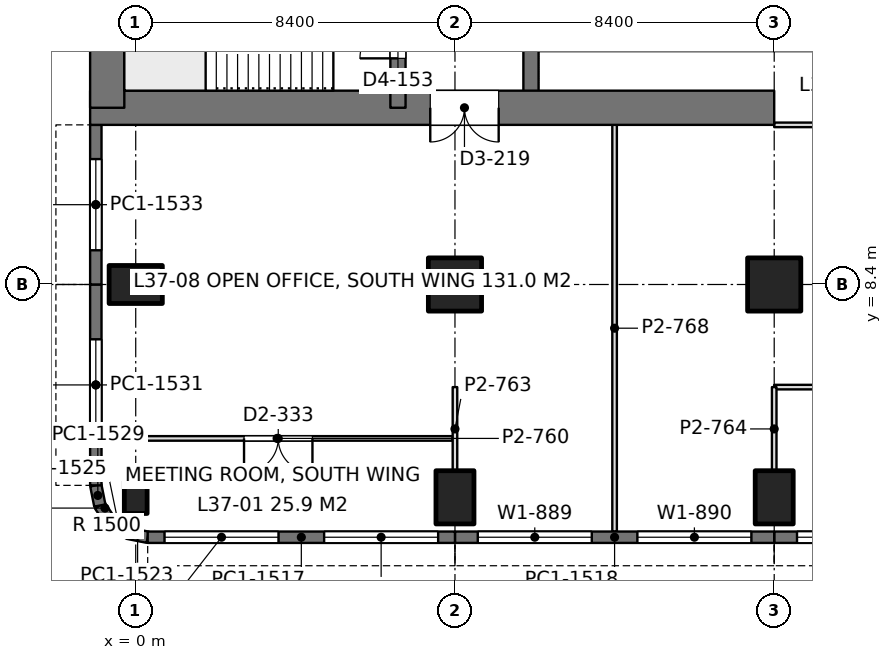
"""IFC4 building model, lengths in metres.
Left out: names, types, materials, properties, quantities, classifications, styles, units other than length and angle.
Written with IfcOpenShell. Run it as: python <this file> out.ifc"""

import sys

from ifc_helpers import new_model, si_unit, direction, frame, frame_2d, origin, origin_2d, place, context, subcontext, project, spatial, rectangle, extrude, element, fill, save


model = new_model("IFC4")
c1 = context("Model", 3, precision=1e-05, world=origin(), true_north=direction((0.0, 1.0)))
c2 = subcontext(c1, "Body", "Model", "MODEL_VIEW")
j1 = project(units=[si_unit("LENGTHUNIT", "METRE"), si_unit("PLANEANGLEUNIT", "RADIAN")], contexts=[c1])
p1 = place(None, origin())
s1 = spatial("IfcSite", under=j1, at=p1, CompositionType="ELEMENT")
p2 = place(p1, origin())
s2 = spatial("IfcBuilding", under=s1, at=p2, CompositionType="ELEMENT")
p3 = place(p2, frame((0.0, 0.0, 163.8)))
s3 = spatial("IfcBuildingStorey", under=s2, at=p3, CompositionType="ELEMENT", Elevation=163.8)
p4 = place(p3, frame((0.0, 2.8, 0.0), z_axis=(0.0, 0.0, 1.0), x_axis=(1.0, 0.0, 0.0)))
e1 = element("IfcColumn", 1, at=p4, inside=s3, PredefinedType="COLUMN", context=c2, shape_type="SweptSolid", body=[
    extrude(rectangle(XDim=0.6, YDim=0.85, at=origin_2d()), origin(), (0.0, 0.0, 1.0), 4.2),
])
for number, where, z_axis, x_axis in (
    (2, (0.0, 8.4, 0.0), (0.0, 0.0, 1.0), (0.0, 1.0, 0.0)),
    (3, (8.4, 2.8, 0.0), (0.0, 0.0, 1.0), (1.0, 0.0, 0.0)),
):
    element("IfcColumn", number, at=place(p3, frame(where, z_axis=z_axis, x_axis=x_axis)), inside=s3, PredefinedType="COLUMN", context=c2, shape_type="SweptSolid", body=[
        extrude(rectangle(XDim=1.0, YDim=1.4, at=origin_2d()), origin(), (0.0, 0.0, 1.0), 4.2),
    ])
p5 = place(p3, frame((8.4, 8.4, 0.0), z_axis=(0.0, 0.0, 1.0), x_axis=(1.0, 0.0, 0.0)))
e4 = element("IfcColumn", 4, at=p5, inside=s3, PredefinedType="COLUMN", context=c2, shape_type="SweptSolid", body=[
    extrude(rectangle(XDim=1.4, YDim=1.4, at=origin_2d()), origin(), (0.0, 0.0, 1.0), 4.2),
])
p6 = place(p3, frame((16.8, 2.8, 0.0), z_axis=(0.0, 0.0, 1.0), x_axis=(1.0, 0.0, 0.0)))
e5 = element("IfcColumn", 5, at=p6, inside=s3, PredefinedType="COLUMN", context=c2, shape_type="SweptSolid", body=[
    extrude(rectangle(XDim=1.0, YDim=1.4, at=origin_2d()), origin(), (0.0, 0.0, 1.0), 4.2),
])
p7 = place(p3, frame((16.8, 8.4, 0.0), z_axis=(0.0, 0.0, 1.0), x_axis=(1.0, 0.0, 0.0)))
e6 = element("IfcColumn", 6, at=p7, inside=s3, PredefinedType="COLUMN", context=c2, shape_type="SweptSolid", body=[
    extrude(rectangle(XDim=1.4, YDim=1.4, at=origin_2d()), origin(), (0.0, 0.0, 1.0), 4.2),
])
p8 = place(p3, frame((-1.2, 13.05, 0.0), z_axis=(0.0, 0.0, 1.0), x_axis=(1.0, 0.0, 0.0)))
e7 = element("IfcWall", 7, at=p8, inside=s3, PredefinedType="SHEAR", context=c2, shape_type="SweptSolid", body=[
    extrude(rectangle(XDim=18.0, YDim=0.9, at=frame_2d((9.0, 0.0))), origin(), (0.0, 0.0, 1.0), 4.2),
])
p9 = place(p8, frame((8.95, 0.0, 0.0)))
e8 = element("IfcOpeningElement", 8, at=p9, cuts=e7, PredefinedType="OPENING", context=c2, shape_type="SweptSolid", body=[
    extrude(rectangle(XDim=1.8, YDim=2.4, at=frame_2d((0.9, 1.2))), frame((0.0, 0.46, 0.0), z_axis=(0.0, -1.0, 0.0), x_axis=(1.0, 0.0, 0.0)), (0.0, 0.0, 1.0), 0.92),
])
p10 = place(p3, frame((-0.75, 13.05, 0.0), z_axis=(0.0, 0.0, 1.0), x_axis=(0.0, 1.0, 0.0)))
e9 = element("IfcWall", 9, at=p10, inside=s3, PredefinedType="SHEAR", context=c2, shape_type="SweptSolid", body=[
    extrude(rectangle(XDim=24.3, YDim=0.9, at=frame_2d((12.15, 0.0))), origin(), (0.0, 0.0, 1.0), 4.2),
])
p11 = place(p3, frame((6.9, 13.05, 0.0), z_axis=(0.0, 0.0, 1.0), x_axis=(0.0, 1.0, 0.0)))
e10 = element("IfcWall", 10, at=p11, inside=s3, PredefinedType="SHEAR", context=c2, shape_type="SweptSolid", body=[
    extrude(rectangle(XDim=24.3, YDim=0.4, at=frame_2d((12.15, 0.0))), origin(), (0.0, 0.0, 1.0), 4.2),
])
p12 = place(p11, frame((1.3, 0.0, 0.0)))
e11 = element("IfcOpeningElement", 11, at=p12, cuts=e10, PredefinedType="OPENING", context=c2, shape_type="SweptSolid", body=[
    extrude(rectangle(XDim=1.0, YDim=2.2, at=frame_2d((0.5, 1.1))), frame((0.0, 0.21, 0.0), z_axis=(0.0, -1.0, 0.0), x_axis=(1.0, 0.0, 0.0)), (0.0, 0.0, 1.0), 0.42),
])
p13 = place(p11, frame((22.0, 0.0, 0.0)))
e12 = element("IfcOpeningElement", 12, at=p13, cuts=e10, PredefinedType="OPENING", context=c2, shape_type="SweptSolid", body=[
    extrude(rectangle(XDim=1.0, YDim=2.2, at=frame_2d((0.5, 1.1))), frame((0.0, 0.21, 0.0), z_axis=(0.0, -1.0, 0.0), x_axis=(1.0, 0.0, 0.0)), (0.0, 0.0, 1.0), 0.42),
])
p14 = place(p11, frame((5.55, 0.0, 0.0)))
e13 = element("IfcOpeningElement", 13, at=p14, cuts=e10, PredefinedType="OPENING", context=c2, shape_type="SweptSolid", body=[
    extrude(rectangle(XDim=1.0, YDim=2.2, at=frame_2d((0.5, 1.1))), frame((0.0, 0.21, 0.0), z_axis=(0.0, -1.0, 0.0), x_axis=(1.0, 0.0, 0.0)), (0.0, 0.0, 1.0), 0.42),
])
p15 = place(p11, frame((9.55, 0.0, 0.0)))
e14 = element("IfcOpeningElement", 14, at=p15, cuts=e10, PredefinedType="OPENING", context=c2, shape_type="SweptSolid", body=[
    extrude(rectangle(XDim=1.0, YDim=2.2, at=frame_2d((0.5, 1.1))), frame((0.0, 0.21, 0.0), z_axis=(0.0, -1.0, 0.0), x_axis=(1.0, 0.0, 0.0)), (0.0, 0.0, 1.0), 0.42),
])
p16 = place(p11, frame((12.8, 0.0, 0.0)))
e15 = element("IfcOpeningElement", 15, at=p16, cuts=e10, PredefinedType="OPENING", context=c2, shape_type="SweptSolid", body=[
    extrude(rectangle(XDim=1.1, YDim=2.2, at=frame_2d((0.55, 1.1))), frame((0.0, 0.21, 0.0), z_axis=(0.0, -1.0, 0.0), x_axis=(1.0, 0.0, 0.0)), (0.0, 0.0, 1.0), 0.42),
])
p17 = place(p11, frame((15.538, 0.0, 0.0)))
e16 = element("IfcOpeningElement", 16, at=p17, cuts=e10, PredefinedType="OPENING", context=c2, shape_type="SweptSolid", body=[
    extrude(rectangle(XDim=1.1, YDim=2.2, at=frame_2d((0.55, 1.1))), frame((0.0, 0.21, 0.0), z_axis=(0.0, -1.0, 0.0), x_axis=(1.0, 0.0, 0.0)), (0.0, 0.0, 1.0), 0.42),
])
p18 = place(p11, frame((18.262, 0.0, 0.0)))
e17 = element("IfcOpeningElement", 17, at=p18, cuts=e10, PredefinedType="OPENING", context=c2, shape_type="SweptSolid", body=[
    extrude(rectangle(XDim=1.1, YDim=2.2, at=frame_2d((0.55, 1.1))), frame((0.0, 0.21, 0.0), z_axis=(0.0, -1.0, 0.0), x_axis=(1.0, 0.0, 0.0)), (0.0, 0.0, 1.0), 0.42),
])
p19 = place(p3, frame((10.4, 13.05, 0.0), z_axis=(0.0, 0.0, 1.0), x_axis=(0.0, 1.0, 0.0)))
e18 = element("IfcWall", 18, at=p19, inside=s3, PredefinedType="SHEAR", context=c2, shape_type="SweptSolid", body=[
    extrude(rectangle(XDim=24.3, YDim=0.4, at=frame_2d((12.15, 0.0))), origin(), (0.0, 0.0, 1.0), 4.2),
])
p20 = place(p19, frame((10.05, 0.0, 0.0)))
e19 = element("IfcOpeningElement", 19, at=p20, cuts=e18, PredefinedType="OPENING", context=c2, shape_type="SweptSolid", body=[
    extrude(rectangle(XDim=1.1, YDim=2.2, at=frame_2d((0.55, 1.1))), frame((0.0, 0.21, 0.0), z_axis=(0.0, -1.0, 0.0), x_axis=(1.0, 0.0, 0.0)), (0.0, 0.0, 1.0), 0.42),
])
p21 = place(p19, frame((12.9, 0.0, 0.0)))
e20 = element("IfcOpeningElement", 20, at=p21, cuts=e18, PredefinedType="OPENING", context=c2, shape_type="SweptSolid", body=[
    extrude(rectangle(XDim=1.1, YDim=2.2, at=frame_2d((0.55, 1.1))), frame((0.0, 0.21, 0.0), z_axis=(0.0, -1.0, 0.0), x_axis=(1.0, 0.0, 0.0)), (0.0, 0.0, 1.0), 0.42),
])
p22 = place(p19, frame((21.45, 0.0, 0.0)))
e21 = element("IfcOpeningElement", 21, at=p22, cuts=e18, PredefinedType="OPENING", context=c2, shape_type="SweptSolid", body=[
    extrude(rectangle(XDim=1.1, YDim=2.2, at=frame_2d((0.55, 1.1))), frame((0.0, 0.21, 0.0), z_axis=(0.0, -1.0, 0.0), x_axis=(1.0, 0.0, 0.0)), (0.0, 0.0, 1.0), 0.42),
])
p23 = place(p19, frame((2.05, 0.0, 0.0)))
e22 = element("IfcOpeningElement", 22, at=p23, cuts=e18, PredefinedType="OPENING", context=c2, shape_type="SweptSolid", body=[
    extrude(rectangle(XDim=1.8, YDim=2.4, at=frame_2d((0.9, 1.2))), frame((0.0, 0.21, 0.0), z_axis=(0.0, -1.0, 0.0), x_axis=(1.0, 0.0, 0.0)), (0.0, 0.0, 1.0), 0.42),
])
p24 = place(p19, frame((5.8, 0.0, 0.0)))
e23 = element("IfcOpeningElement", 23, at=p24, cuts=e18, PredefinedType="OPENING", context=c2, shape_type="SweptSolid", body=[
    extrude(rectangle(XDim=1.8, YDim=2.4, at=frame_2d((0.9, 1.2))), frame((0.0, 0.21, 0.0), z_axis=(0.0, -1.0, 0.0), x_axis=(1.0, 0.0, 0.0)), (0.0, 0.0, 1.0), 0.42),
])
p25 = place(p3, frame((25.2, 1.75, 0.0), z_axis=(0.0, 0.0, 1.0), x_axis=(-1.0, 0.0, 0.0)))
e24 = element("IfcWall", 24, at=p25, inside=s3, PredefinedType="SOLIDWALL", context=c2, shape_type="SweptSolid", body=[
    extrude(rectangle(XDim=8.4, YDim=0.3, at=frame_2d((4.2, 0.0))), origin(), (0.0, 0.0, 1.0), 4.0),
])
p26 = place(p25, frame((0.6, 0.0, 0.9)))
e25 = element("IfcOpeningElement", 25, at=p26, cuts=e24, PredefinedType="OPENING", context=c2, shape_type="SweptSolid", body=[
    extrude(rectangle(XDim=3.0, YDim=1.9, at=frame_2d((1.5, 0.95))), frame((0.0, 0.16, 0.0), z_axis=(0.0, -1.0, 0.0), x_axis=(1.0, 0.0, 0.0)), (0.0, 0.0, 1.0), 0.32),
])
p27 = place(p25, frame((4.8, 0.0, 0.9)))
e26 = element("IfcOpeningElement", 26, at=p27, cuts=e24, PredefinedType="OPENING", context=c2, shape_type="SweptSolid", body=[
    extrude(rectangle(XDim=3.0, YDim=1.9, at=frame_2d((1.5, 0.95))), frame((0.0, 0.16, 0.0), z_axis=(0.0, -1.0, 0.0), x_axis=(1.0, 0.0, 0.0)), (0.0, 0.0, 1.0), 0.32),
])
p28 = place(p3, frame((16.8, 1.75, 0.0), z_axis=(0.0, 0.0, 1.0), x_axis=(-1.0, 0.0, 0.0)))
e27 = element("IfcWall", 27, at=p28, inside=s3, PredefinedType="SOLIDWALL", context=c2, shape_type="SweptSolid", body=[
    extrude(rectangle(XDim=8.4, YDim=0.3, at=frame_2d((4.2, 0.0))), origin(), (0.0, 0.0, 1.0), 4.0),
])
p29 = place(p28, frame((0.6, 0.0, 0.9)))
e28 = element("IfcOpeningElement", 28, at=p29, cuts=e27, PredefinedType="OPENING", context=c2, shape_type="SweptSolid", body=[
    extrude(rectangle(XDim=3.0, YDim=1.9, at=frame_2d((1.5, 0.95))), frame((0.0, 0.16, 0.0), z_axis=(0.0, -1.0, 0.0), x_axis=(1.0, 0.0, 0.0)), (0.0, 0.0, 1.0), 0.32),
])
p30 = place(p28, frame((4.8, 0.0, 0.9)))
e29 = element("IfcOpeningElement", 29, at=p30, cuts=e27, PredefinedType="OPENING", context=c2, shape_type="SweptSolid", body=[
    extrude(rectangle(XDim=3.0, YDim=1.9, at=frame_2d((1.5, 0.95))), frame((0.0, 0.16, 0.0), z_axis=(0.0, -1.0, 0.0), x_axis=(1.0, 0.0, 0.0)), (0.0, 0.0, 1.0), 0.32),
])
p31 = place(p3, frame((8.4, 1.75, 0.0), z_axis=(0.0, 0.0, 1.0), x_axis=(-1.0, 0.0, 0.0)))
e30 = element("IfcWall", 30, at=p31, inside=s3, PredefinedType="SOLIDWALL", context=c2, shape_type="SweptSolid", body=[
    extrude(rectangle(XDim=8.085, YDim=0.3, at=frame_2d((4.042, 0.0))), origin(), (0.0, 0.0, 1.0), 4.0),
])
p32 = place(p31, frame((0.443, 0.0, 0.9)))
e31 = element("IfcOpeningElement", 31, at=p32, cuts=e30, PredefinedType="OPENING", context=c2, shape_type="SweptSolid", body=[
    extrude(rectangle(XDim=3.0, YDim=1.9, at=frame_2d((1.5, 0.95))), frame((0.0, 0.16, 0.0), z_axis=(0.0, -1.0, 0.0), x_axis=(1.0, 0.0, 0.0)), (0.0, 0.0, 1.0), 0.32),
])
p33 = place(p31, frame((4.643, 0.0, 0.9)))
e32 = element("IfcOpeningElement", 32, at=p33, cuts=e30, PredefinedType="OPENING", context=c2, shape_type="SweptSolid", body=[
    extrude(rectangle(XDim=3.0, YDim=1.9, at=frame_2d((1.5, 0.95))), frame((0.0, 0.16, 0.0), z_axis=(0.0, -1.0, 0.0), x_axis=(1.0, 0.0, 0.0)), (0.0, 0.0, 1.0), 0.32),
])
p34 = place(p3, frame((0.315, 1.75, 0.0), z_axis=(0.0, 0.0, 1.0), x_axis=(-0.980788534345, 0.195073962632, 0.0)))
e33 = element("IfcWall", 33, at=p34, inside=s3, PredefinedType="SOLIDWALL", context=c2, shape_type="SweptSolid", body=[
    extrude(rectangle(XDim=0.541, YDim=0.3, at=frame_2d((0.271, 0.0))), origin(), (0.0, 0.0, 1.0), 4.0),
])
for number, where, z_axis, x_axis in (
    (34, (-0.216, 1.855, 0.0), (0.0, 0.0, 1.0), (-0.831, 0.556, 0.0)),
    (35, (-0.653, 2.147, 0.0), (0.0, 0.0, 1.0), (-0.556, 0.831, 0.0)),
):
    element("IfcWall", number, at=place(p3, frame(where, z_axis=z_axis, x_axis=x_axis)), inside=s3, PredefinedType="SOLIDWALL", context=c2, shape_type="SweptSolid", body=[
        extrude(rectangle(XDim=0.526, YDim=0.3, at=frame_2d((0.263, 0.0))), origin(), (0.0, 0.0, 1.0), 4.0),
    ])
p35 = place(p3, frame((-0.945, 2.584, 0.0), z_axis=(0.0, 0.0, 1.0), x_axis=(-0.195073962632, 0.980788534345, 0.0)))
e36 = element("IfcWall", 36, at=p35, inside=s3, PredefinedType="SOLIDWALL", context=c2, shape_type="SweptSolid", body=[
    extrude(rectangle(XDim=0.541, YDim=0.3, at=frame_2d((0.271, 0.0))), origin(), (0.0, 0.0, 1.0), 4.0),
])
p36 = place(p3, frame((-1.05, 3.115, 0.0), z_axis=(0.0, 0.0, 1.0), x_axis=(0.0, 1.0, 0.0)))
e37 = element("IfcWall", 37, at=p36, inside=s3, PredefinedType="SOLIDWALL", context=c2, shape_type="SweptSolid", body=[
    extrude(rectangle(XDim=5.285, YDim=0.3, at=frame_2d((2.643, 0.0))), origin(), (0.0, 0.0, 1.0), 4.0),
])
p37 = place(p36, frame((1.443, 0.0, 0.9)))
e38 = element("IfcOpeningElement", 38, at=p37, cuts=e37, PredefinedType="OPENING", context=c2, shape_type="SweptSolid", body=[
    extrude(rectangle(XDim=2.4, YDim=1.9, at=frame_2d((1.2, 0.95))), frame((0.0, 0.16, 0.0), z_axis=(0.0, -1.0, 0.0), x_axis=(1.0, 0.0, 0.0)), (0.0, 0.0, 1.0), 0.32),
])
p38 = place(p3, frame((-1.05, 8.4, 0.0), z_axis=(0.0, 0.0, 1.0), x_axis=(0.0, 1.0, 0.0)))
e39 = element("IfcWall", 39, at=p38, inside=s3, PredefinedType="SOLIDWALL", context=c2, shape_type="SweptSolid", body=[
    extrude(rectangle(XDim=4.2, YDim=0.3, at=frame_2d((2.1, 0.0))), origin(), (0.0, 0.0, 1.0), 4.0),
])
p39 = place(p38, frame((0.9, 0.0, 0.9)))
e40 = element("IfcOpeningElement", 40, at=p39, cuts=e39, PredefinedType="OPENING", context=c2, shape_type="SweptSolid", body=[
    extrude(rectangle(XDim=2.4, YDim=1.9, at=frame_2d((1.2, 0.95))), frame((0.0, 0.16, 0.0), z_axis=(0.0, -1.0, 0.0), x_axis=(1.0, 0.0, 0.0)), (0.0, 0.0, 1.0), 0.32),
])
p40 = place(p3, frame((-0.902, 4.35, 0.0), z_axis=(0.0, 0.0, 1.0), x_axis=(1.0, 0.0, 0.0)))
e41 = element("IfcWall", 41, at=p40, inside=s3, PredefinedType="PARTITIONING", context=c2, shape_type="SweptSolid", body=[
    extrude(rectangle(XDim=9.244, YDim=0.12, at=frame_2d((4.622, 0.0))), origin(), (0.0, 0.0, 1.0), 3.3),
])
p41 = place(p40, frame((3.752, 0.0, 0.0)))
e42 = element("IfcOpeningElement", 42, at=p41, cuts=e41, PredefinedType="OPENING", context=c2, shape_type="SweptSolid", body=[
    extrude(rectangle(XDim=1.8, YDim=2.2, at=frame_2d((0.9, 1.1))), frame((0.0, 0.07, 0.0), z_axis=(0.0, -1.0, 0.0), x_axis=(1.0, 0.0, 0.0)), (0.0, 0.0, 1.0), 0.14),
])
p42 = place(p3, frame((8.4, 3.499, 0.0), z_axis=(0.0, 0.0, 1.0), x_axis=(0.0, 1.0, 0.0)))
e43 = element("IfcWall", 43, at=p42, inside=s3, PredefinedType="PARTITIONING", context=c2, shape_type="SweptSolid", body=[
    extrude(rectangle(XDim=2.201, YDim=0.12, at=frame_2d((1.101, 0.0))), origin(), (0.0, 0.0, 1.0), 3.3),
])
p43 = place(p3, frame((16.8, 5.7, 0.0), z_axis=(0.0, 0.0, 1.0), x_axis=(1.0, 0.0, 0.0)))
e44 = element("IfcWall", 44, at=p43, inside=s3, PredefinedType="PARTITIONING", context=c2, shape_type="SweptSolid", body=[
    extrude(rectangle(XDim=16.8, YDim=0.12, at=frame_2d((8.4, 0.0))), origin(), (0.0, 0.0, 1.0), 3.3),
])
p44 = place(p43, frame((1.6, 0.0, 0.0)))
e45 = element("IfcOpeningElement", 45, at=p44, cuts=e44, PredefinedType="OPENING", context=c2, shape_type="SweptSolid", body=[
    extrude(rectangle(XDim=1.0, YDim=2.4, at=frame_2d((0.5, 1.2))), frame((0.0, 0.07, 0.0), z_axis=(0.0, -1.0, 0.0), x_axis=(1.0, 0.0, 0.0)), (0.0, 0.0, 1.0), 0.14),
])
p45 = place(p43, frame((5.8, 0.0, 0.0)))
e46 = element("IfcOpeningElement", 46, at=p45, cuts=e44, PredefinedType="OPENING", context=c2, shape_type="SweptSolid", body=[
    extrude(rectangle(XDim=1.0, YDim=2.4, at=frame_2d((0.5, 1.2))), frame((0.0, 0.07, 0.0), z_axis=(0.0, -1.0, 0.0), x_axis=(1.0, 0.0, 0.0)), (0.0, 0.0, 1.0), 0.14),
])
p46 = place(p43, frame((10.0, 0.0, 0.0)))
e47 = element("IfcOpeningElement", 47, at=p46, cuts=e44, PredefinedType="OPENING", context=c2, shape_type="SweptSolid", body=[
    extrude(rectangle(XDim=1.0, YDim=2.4, at=frame_2d((0.5, 1.2))), frame((0.0, 0.07, 0.0), z_axis=(0.0, -1.0, 0.0), x_axis=(1.0, 0.0, 0.0)), (0.0, 0.0, 1.0), 0.14),
])
p47 = place(p43, frame((14.2, 0.0, 0.0)))
e48 = element("IfcOpeningElement", 48, at=p47, cuts=e44, PredefinedType="OPENING", context=c2, shape_type="SweptSolid", body=[
    extrude(rectangle(XDim=1.0, YDim=2.4, at=frame_2d((0.5, 1.2))), frame((0.0, 0.07, 0.0), z_axis=(0.0, -1.0, 0.0), x_axis=(1.0, 0.0, 0.0)), (0.0, 0.0, 1.0), 0.14),
])
p48 = place(p3, frame((16.8, 3.499, 0.0), z_axis=(0.0, 0.0, 1.0), x_axis=(0.0, 1.0, 0.0)))
e49 = element("IfcWall", 49, at=p48, inside=s3, PredefinedType="PARTITIONING", context=c2, shape_type="SweptSolid", body=[
    extrude(rectangle(XDim=2.201, YDim=0.12, at=frame_2d((1.101, 0.0))), origin(), (0.0, 0.0, 1.0), 3.3),
])
p49 = place(p3, frame((12.6, 1.898, 0.0), z_axis=(0.0, 0.0, 1.0), x_axis=(0.0, 1.0, 0.0)))
e50 = element("IfcWall", 50, at=p49, inside=s3, PredefinedType="PARTITIONING", context=c2, shape_type="SweptSolid", body=[
    extrude(rectangle(XDim=10.704, YDim=0.12, at=frame_2d((5.352, 0.0))), origin(), (0.0, 0.0, 1.0), 3.3),
])
p50 = place(p3, frame((16.8, 12.6, 0.0), z_axis=(0.0, 0.0, 1.0), x_axis=(1.0, 0.0, 0.0)))
e51 = element("IfcWall", 51, at=p50, inside=s3, PredefinedType="PARTITIONING", context=c2, shape_type="SweptSolid", body=[
    extrude(rectangle(XDim=16.8, YDim=0.12, at=frame_2d((8.4, 0.0))), origin(), (0.0, 0.0, 1.0), 3.3),
])
p51 = place(p27, origin())
e52 = element("IfcWindow", 52, at=p51, inside=s3, PartitioningType="SINGLE_PANEL", PredefinedType="WINDOW", context=c2, shape_type="SweptSolid", body=[
    extrude(rectangle(XDim=3.0, YDim=1.9, at=frame_2d((1.5, 0.95))), frame((0.0, 0.03, 0.0), z_axis=(0.0, -1.0, 0.0), x_axis=(1.0, 0.0, 0.0)), (0.0, 0.0, 1.0), 0.06),
])
fill(e26, e52)
p52 = place(p29, origin())
e53 = element("IfcWindow", 53, at=p52, inside=s3, PartitioningType="SINGLE_PANEL", PredefinedType="WINDOW", context=c2, shape_type="SweptSolid", body=[
    extrude(rectangle(XDim=3.0, YDim=1.9, at=frame_2d((1.5, 0.95))), frame((0.0, 0.03, 0.0), z_axis=(0.0, -1.0, 0.0), x_axis=(1.0, 0.0, 0.0)), (0.0, 0.0, 1.0), 0.06),
])
fill(e28, e53)
p53 = place(p30, origin())
e54 = element("IfcWindow", 54, at=p53, inside=s3, PartitioningType="SINGLE_PANEL", PredefinedType="WINDOW", context=c2, shape_type="SweptSolid", body=[
    extrude(rectangle(XDim=3.0, YDim=1.9, at=frame_2d((1.5, 0.95))), frame((0.0, 0.03, 0.0), z_axis=(0.0, -1.0, 0.0), x_axis=(1.0, 0.0, 0.0)), (0.0, 0.0, 1.0), 0.06),
])
fill(e29, e54)
p54 = place(p32, origin())
e55 = element("IfcWindow", 55, at=p54, inside=s3, PartitioningType="SINGLE_PANEL", PredefinedType="WINDOW", context=c2, shape_type="SweptSolid", body=[
    extrude(rectangle(XDim=3.0, YDim=1.9, at=frame_2d((1.5, 0.95))), frame((0.0, 0.03, 0.0), z_axis=(0.0, -1.0, 0.0), x_axis=(1.0, 0.0, 0.0)), (0.0, 0.0, 1.0), 0.06),
])
fill(e31, e55)
p55 = place(p33, origin())
e56 = element("IfcWindow", 56, at=p55, inside=s3, PartitioningType="SINGLE_PANEL", PredefinedType="WINDOW", context=c2, shape_type="SweptSolid", body=[
    extrude(rectangle(XDim=3.0, YDim=1.9, at=frame_2d((1.5, 0.95))), frame((0.0, 0.03, 0.0), z_axis=(0.0, -1.0, 0.0), x_axis=(1.0, 0.0, 0.0)), (0.0, 0.0, 1.0), 0.06),
])
fill(e32, e56)
p56 = place(p37, origin())
e57 = element("IfcWindow", 57, at=p56, inside=s3, PartitioningType="SINGLE_PANEL", PredefinedType="WINDOW", context=c2, shape_type="SweptSolid", body=[
    extrude(rectangle(XDim=2.4, YDim=1.9, at=frame_2d((1.2, 0.95))), frame((0.0, 0.03, 0.0), z_axis=(0.0, -1.0, 0.0), x_axis=(1.0, 0.0, 0.0)), (0.0, 0.0, 1.0), 0.06),
])
fill(e38, e57)
p57 = place(p39, origin())
e58 = element("IfcWindow", 58, at=p57, inside=s3, PartitioningType="SINGLE_PANEL", PredefinedType="WINDOW", context=c2, shape_type="SweptSolid", body=[
    extrude(rectangle(XDim=2.4, YDim=1.9, at=frame_2d((1.2, 0.95))), frame((0.0, 0.03, 0.0), z_axis=(0.0, -1.0, 0.0), x_axis=(1.0, 0.0, 0.0)), (0.0, 0.0, 1.0), 0.06),
])
fill(e40, e58)
p58 = place(p9, frame((1.8, 0.0, 0.0), z_axis=(0.0, 0.0, 1.0), x_axis=(-1.0, 0.0, 0.0)))
e59 = element("IfcDoor", 59, at=p58, inside=s3, OperationType="DOUBLE_DOOR_SINGLE_SWING", PredefinedType="DOOR", context=c2, shape_type="SweptSolid", body=[
    extrude(rectangle(XDim=1.8, YDim=2.4, at=frame_2d((0.9, 1.2))), frame((0.0, 0.025, 0.0), z_axis=(0.0, -1.0, 0.0), x_axis=(1.0, 0.0, 0.0)), (0.0, 0.0, 1.0), 0.05),
])
fill(e8, e59)
p59 = place(p12, origin())
e60 = element("IfcDoor", 60, at=p59, inside=s3, OperationType="SINGLE_SWING_LEFT", PredefinedType="DOOR", context=c2, shape_type="SweptSolid", body=[
    extrude(rectangle(XDim=1.0, YDim=2.2, at=frame_2d((0.5, 1.1))), frame((0.0, 0.025, 0.0), z_axis=(0.0, -1.0, 0.0), x_axis=(1.0, 0.0, 0.0)), (0.0, 0.0, 1.0), 0.05),
])
fill(e11, e60)
p60 = place(p41, frame((1.8, 0.0, 0.0), z_axis=(0.0, 0.0, 1.0), x_axis=(-1.0, 0.0, 0.0)))
e61 = element("IfcDoor", 61, at=p60, inside=s3, OperationType="DOUBLE_DOOR_SINGLE_SWING", PredefinedType="DOOR", context=c2, shape_type="SweptSolid", body=[
    extrude(rectangle(XDim=1.8, YDim=2.2, at=frame_2d((0.9, 1.1))), frame((0.0, 0.025, 0.0), z_axis=(0.0, -1.0, 0.0), x_axis=(1.0, 0.0, 0.0)), (0.0, 0.0, 1.0), 0.05),
])
fill(e42, e61)
save(model, sys.argv[1])
